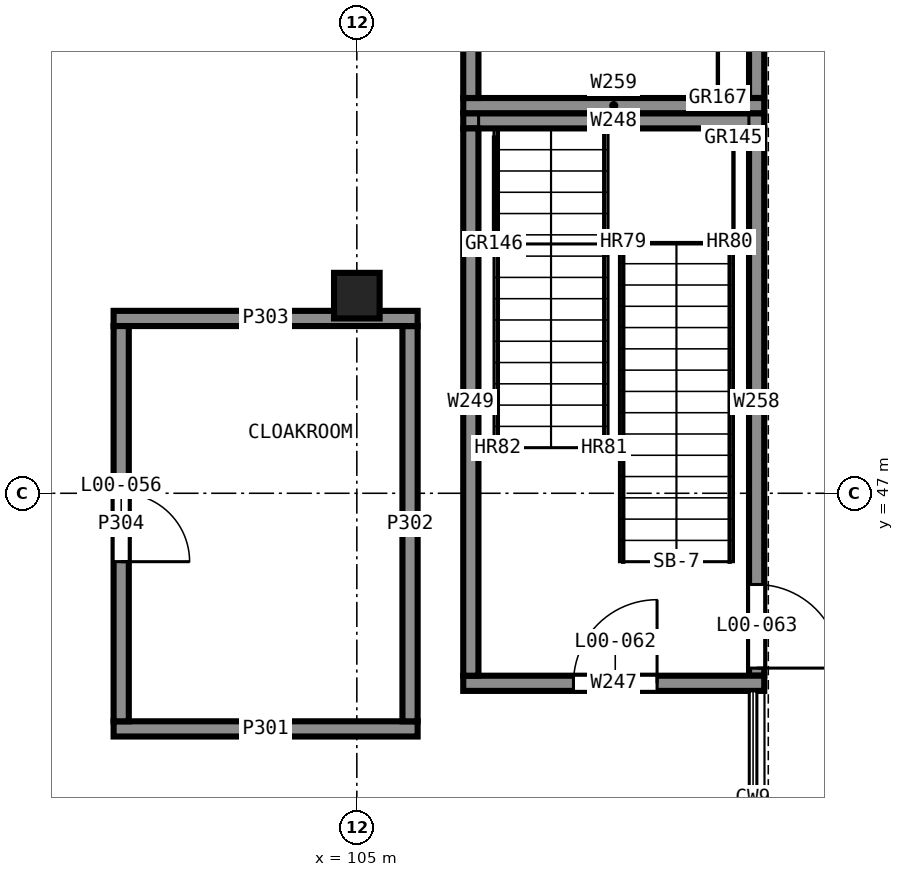
"""IFC4 building model, lengths in metres.
Left out: names, types, materials, properties, quantities, classifications, styles, units other than length and angle.
Written with IfcOpenShell. Run it as: python <this file> out.ifc"""

import sys

from ifc_helpers import new_model, si_unit, direction, frame, frame_2d, origin, origin_2d, place, context, subcontext, project, spatial, rectangle, extrude, element, fill, save


model = new_model("IFC4")
c1 = context("Model", 3, precision=1e-05, world=origin(), true_north=direction((0.0, 1.0)))
c2 = subcontext(c1, "Body", "Model", "MODEL_VIEW")
j1 = project(units=[si_unit("LENGTHUNIT", "METRE"), si_unit("PLANEANGLEUNIT", "RADIAN")], contexts=[c1])
p1 = place(None, origin())
s1 = spatial("IfcSite", under=j1, at=p1, CompositionType="ELEMENT")
p2 = place(p1, origin())
s2 = spatial("IfcBuilding", under=s1, at=p2, CompositionType="ELEMENT")
p3 = place(p2, origin())
s3 = spatial("IfcBuildingStorey", under=s2, at=p3, CompositionType="ELEMENT", Elevation=0.0)
p4 = place(p3, frame((106.4, 44.5, 0.0), z_axis=(0.0, 0.0, 1.0), x_axis=(1.0, 0.0, 0.0)))
e1 = element("IfcWall", 1, at=p4, inside=s3, PredefinedType="SHEAR", context=c2, shape_type="SweptSolid", body=[
    extrude(rectangle(XDim=3.96, YDim=0.2, at=frame_2d((1.98, 0.0))), origin(), (0.0, 0.0, 1.0), 5.5),
])
p5 = place(p4, frame((1.45, 0.0, 0.0)))
e2 = element("IfcOpeningElement", 2, at=p5, cuts=e1, PredefinedType="OPENING", context=c2, shape_type="SweptSolid", body=[
    extrude(rectangle(XDim=1.1, YDim=2.1, at=frame_2d((0.55, 1.05))), frame((0.0, 0.11, 0.0), z_axis=(0.0, -1.0, 0.0), x_axis=(1.0, 0.0, 0.0)), (0.0, 0.0, 1.0), 0.22),
])
p6 = place(p3, frame((110.36, 51.9, 0.0), z_axis=(0.0, 0.0, 1.0), x_axis=(-1.0, 0.0, 0.0)))
e3 = element("IfcWall", 3, at=p6, inside=s3, PredefinedType="SHEAR", context=c2, shape_type="SweptSolid", body=[
    extrude(rectangle(XDim=3.96, YDim=0.2, at=frame_2d((1.98, 0.0))), origin(), (0.0, 0.0, 1.0), 5.5),
])
p7 = place(p3, frame((106.5, 51.8, 0.0), z_axis=(0.0, 0.0, 1.0), x_axis=(0.0, -1.0, 0.0)))
e4 = element("IfcWall", 4, at=p7, inside=s3, PredefinedType="SHEAR", context=c2, shape_type="SweptSolid", body=[
    extrude(rectangle(XDim=7.2, YDim=0.2, at=frame_2d((3.6, 0.0))), origin(), (0.0, 0.0, 1.0), 5.5),
])
p8 = place(p3, frame((110.26, 44.6, 0.0), z_axis=(0.0, 0.0, 1.0), x_axis=(0.0, 1.0, 0.0)))
e5 = element("IfcWall", 5, at=p8, inside=s3, PredefinedType="SHEAR", context=c2, shape_type="SweptSolid", body=[
    extrude(rectangle(XDim=7.2, YDim=0.2, at=frame_2d((3.6, 0.0))), origin(), (0.0, 0.0, 1.0), 5.5),
])
p9 = place(p8, frame((0.1, 0.0, 0.0)))
e6 = element("IfcOpeningElement", 6, at=p9, cuts=e5, PredefinedType="OPENING", context=c2, shape_type="SweptSolid", body=[
    extrude(rectangle(XDim=1.1, YDim=2.1, at=frame_2d((0.55, 1.05))), frame((0.0, 0.11, 0.0), z_axis=(0.0, -1.0, 0.0), x_axis=(1.0, 0.0, 0.0)), (0.0, 0.0, 1.0), 0.22),
])
p10 = place(p3, frame((106.4, 52.1, 0.0), z_axis=(0.0, 0.0, 1.0), x_axis=(1.0, 0.0, 0.0)))
e7 = element("IfcWall", 7, at=p10, inside=s3, PredefinedType="SHEAR", context=c2, shape_type="SweptSolid", body=[
    extrude(rectangle(XDim=3.96, YDim=0.2, at=frame_2d((1.98, 0.0))), origin(), (0.0, 0.0, 1.0), 5.2),
])
p11 = place(p3, frame((106.5, 59.2, 0.0), z_axis=(0.0, 0.0, 1.0), x_axis=(0.0, -1.0, 0.0)))
e8 = element("IfcWall", 8, at=p11, inside=s3, PredefinedType="SHEAR", context=c2, shape_type="SweptSolid", body=[
    extrude(rectangle(XDim=7.0, YDim=0.2, at=frame_2d((3.5, 0.0))), origin(), (0.0, 0.0, 1.0), 5.2),
])
p12 = place(p11, frame((0.1, 0.0, 0.0)))
e9 = element("IfcOpeningElement", 9, at=p12, cuts=e8, PredefinedType="OPENING", context=c2, shape_type="SweptSolid", body=[
    extrude(rectangle(XDim=1.1, YDim=2.1, at=frame_2d((0.55, 1.05))), frame((0.0, 0.11, 0.0), z_axis=(0.0, -1.0, 0.0), x_axis=(1.0, 0.0, 0.0)), (0.0, 0.0, 1.0), 0.22),
])
p13 = place(p3, frame((110.26, 52.2, 0.0), z_axis=(0.0, 0.0, 1.0), x_axis=(0.0, 1.0, 0.0)))
e10 = element("IfcWall", 10, at=p13, inside=s3, PredefinedType="SHEAR", context=c2, shape_type="SweptSolid", body=[
    extrude(rectangle(XDim=7.0, YDim=0.2, at=frame_2d((3.5, 0.0))), origin(), (0.0, 0.0, 1.0), 5.2),
])
p14 = place(p13, frame((5.55, 0.0, 0.0)))
e11 = element("IfcOpeningElement", 11, at=p14, cuts=e10, PredefinedType="OPENING", context=c2, shape_type="SweptSolid", body=[
    extrude(rectangle(XDim=1.1, YDim=2.1, at=frame_2d((0.55, 1.05))), frame((0.0, 0.11, 0.0), z_axis=(0.0, -1.0, 0.0), x_axis=(1.0, 0.0, 0.0)), (0.0, 0.0, 1.0), 0.22),
])
p15 = place(p3, frame((105.0, 49.6, 0.0), z_axis=(0.0, 0.0, 1.0), x_axis=(1.0, 0.0, 0.0)))
e12 = element("IfcColumn", 12, at=p15, inside=s3, PredefinedType="COLUMN", context=c2, shape_type="SweptSolid", body=[
    extrude(rectangle(XDim=0.6, YDim=0.6, at=origin_2d()), origin(), (0.0, 0.0, 1.0), 5.5),
])
p16 = place(p3, frame((101.8, 43.9, 0.0), z_axis=(0.0, 0.0, 1.0), x_axis=(1.0, 0.0, 0.0)))
e13 = element("IfcWall", 13, at=p16, inside=s3, PredefinedType="PARTITIONING", context=c2, shape_type="SweptSolid", body=[
    extrude(rectangle(XDim=4.0, YDim=0.2, at=frame_2d((2.0, 0.0))), origin(), (0.0, 0.0, 1.0), 5.2),
])
p17 = place(p3, frame((105.7, 44.0, 0.0), z_axis=(0.0, 0.0, 1.0), x_axis=(0.0, 1.0, 0.0)))
e14 = element("IfcWall", 14, at=p17, inside=s3, PredefinedType="PARTITIONING", context=c2, shape_type="SweptSolid", body=[
    extrude(rectangle(XDim=5.2, YDim=0.2, at=frame_2d((2.6, 0.0))), origin(), (0.0, 0.0, 1.0), 5.2),
])
p18 = place(p3, frame((105.8, 49.3, 0.0), z_axis=(0.0, 0.0, 1.0), x_axis=(-1.0, 0.0, 0.0)))
e15 = element("IfcWall", 15, at=p18, inside=s3, PredefinedType="PARTITIONING", context=c2, shape_type="SweptSolid", body=[
    extrude(rectangle(XDim=4.0, YDim=0.2, at=frame_2d((2.0, 0.0))), origin(), (0.0, 0.0, 1.0), 5.2),
])
p19 = place(p3, frame((101.9, 49.2, 0.0), z_axis=(0.0, 0.0, 1.0), x_axis=(0.0, -1.0, 0.0)))
e16 = element("IfcWall", 16, at=p19, inside=s3, PredefinedType="PARTITIONING", context=c2, shape_type="SweptSolid", body=[
    extrude(rectangle(XDim=5.2, YDim=0.2, at=frame_2d((2.6, 0.0))), origin(), (0.0, 0.0, 1.0), 5.2),
])
p20 = place(p19, frame((2.2, 0.0, 0.0)))
e17 = element("IfcOpeningElement", 17, at=p20, cuts=e16, PredefinedType="OPENING", context=c2, shape_type="SweptSolid", body=[
    extrude(rectangle(XDim=0.9, YDim=2.1, at=frame_2d((0.45, 1.05))), frame((0.0, 0.11, 0.0), z_axis=(0.0, -1.0, 0.0), x_axis=(1.0, 0.0, 0.0)), (0.0, 0.0, 1.0), 0.22),
])
p21 = place(p20, origin())
e18 = element("IfcDoor", 18, at=p21, inside=s3, OperationType="SINGLE_SWING_LEFT", PredefinedType="DOOR", context=c2, shape_type="SweptSolid", body=[
    extrude(rectangle(XDim=0.9, YDim=2.1, at=frame_2d((0.45, 1.05))), frame((0.0, 0.025, 0.0), z_axis=(0.0, -1.0, 0.0), x_axis=(1.0, 0.0, 0.0)), (0.0, 0.0, 1.0), 0.05),
])
fill(e17, e18)
p22 = place(p5, origin())
e19 = element("IfcDoor", 19, at=p22, inside=s3, OperationType="SINGLE_SWING_LEFT", PredefinedType="DOOR", context=c2, shape_type="SweptSolid", body=[
    extrude(rectangle(XDim=1.1, YDim=2.1, at=frame_2d((0.55, 1.05))), frame((0.0, 0.025, 0.0), z_axis=(0.0, -1.0, 0.0), x_axis=(1.0, 0.0, 0.0)), (0.0, 0.0, 1.0), 0.05),
])
fill(e2, e19)
p23 = place(p9, frame((1.1, 0.0, 0.0), z_axis=(0.0, 0.0, 1.0), x_axis=(-1.0, 0.0, 0.0)))
e20 = element("IfcDoor", 20, at=p23, inside=s3, OperationType="SINGLE_SWING_LEFT", PredefinedType="DOOR", context=c2, shape_type="SweptSolid", body=[
    extrude(rectangle(XDim=1.1, YDim=2.1, at=frame_2d((0.55, 1.05))), frame((0.0, 0.025, 0.0), z_axis=(0.0, -1.0, 0.0), x_axis=(1.0, 0.0, 0.0)), (0.0, 0.0, 1.0), 0.05),
])
fill(e6, e20)
save(model, sys.argv[1])
